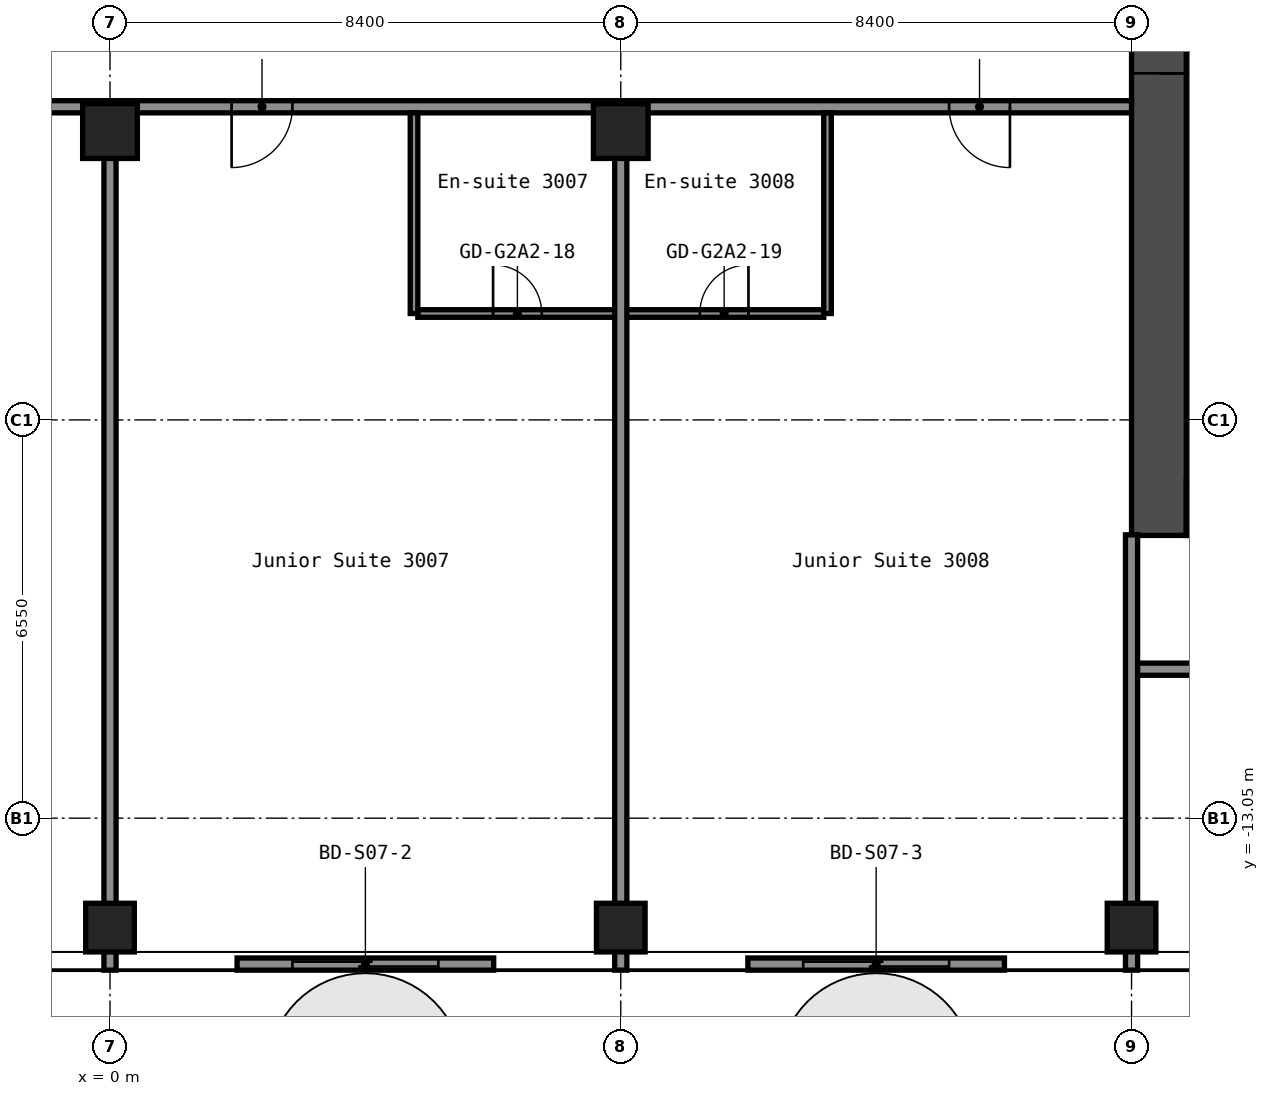
"""IFC4 building model, lengths in metres.
Left out: names, types, materials, properties, quantities, classifications, styles, units other than length and angle.
Written with IfcOpenShell. Run it as: python <this file> out.ifc"""

import sys

from ifc_helpers import new_model, si_unit, direction, frame, frame_2d, origin, origin_2d, place, context, subcontext, project, spatial, rectangle, hollow_rectangle, extrude, element, fill, save


model = new_model("IFC4")
c1 = context("Model", 3, precision=1e-05, world=origin(), true_north=direction((0.0, 1.0)))
c2 = subcontext(c1, "Body", "Model", "MODEL_VIEW")
j1 = project(units=[si_unit("LENGTHUNIT", "METRE"), si_unit("PLANEANGLEUNIT", "RADIAN")], contexts=[c1])
p1 = place(None, origin())
s1 = spatial("IfcSite", under=j1, at=p1, CompositionType="ELEMENT")
p2 = place(p1, origin())
s2 = spatial("IfcBuilding", under=s1, at=p2, CompositionType="ELEMENT")
p3 = place(p2, frame((0.0, 0.0, 107.4)))
s3 = spatial("IfcBuildingStorey", under=s2, at=p3, CompositionType="ELEMENT", Elevation=107.4)
p4 = place(p3, frame((0.0, -14.85, 0.0), z_axis=(0.0, 0.0, 1.0), x_axis=(1.0, 0.0, 0.0)))
e1 = element("IfcColumn", 1, at=p4, inside=s3, PredefinedType="COLUMN", context=c2, shape_type="SweptSolid", body=[
    extrude(hollow_rectangle(XDim=0.8, YDim=0.8, WallThickness=0.032, at=origin_2d()), origin(), (0.0, 0.0, 1.0), 2.8),
])
p5 = place(p3, frame((0.0, -1.75, 0.0), z_axis=(0.0, 0.0, 1.0), x_axis=(1.0, 0.0, 0.0)))
e2 = element("IfcColumn", 2, at=p5, inside=s3, PredefinedType="COLUMN", context=c2, shape_type="SweptSolid", body=[
    extrude(hollow_rectangle(XDim=0.9, YDim=0.9, WallThickness=0.036, at=origin_2d()), origin(), (0.0, 0.0, 1.0), 2.8),
])
p6 = place(p3, frame((8.4, -14.85, 0.0), z_axis=(0.0, 0.0, 1.0), x_axis=(1.0, 0.0, 0.0)))
e3 = element("IfcColumn", 3, at=p6, inside=s3, PredefinedType="COLUMN", context=c2, shape_type="SweptSolid", body=[
    extrude(hollow_rectangle(XDim=0.8, YDim=0.8, WallThickness=0.032, at=origin_2d()), origin(), (0.0, 0.0, 1.0), 2.8),
])
p7 = place(p3, frame((8.4, -1.75, 0.0), z_axis=(0.0, 0.0, 1.0), x_axis=(1.0, 0.0, 0.0)))
e4 = element("IfcColumn", 4, at=p7, inside=s3, PredefinedType="COLUMN", context=c2, shape_type="SweptSolid", body=[
    extrude(hollow_rectangle(XDim=0.9, YDim=0.9, WallThickness=0.036, at=origin_2d()), origin(), (0.0, 0.0, 1.0), 2.8),
])
p8 = place(p3, frame((16.8, -14.85, 0.0), z_axis=(0.0, 0.0, 1.0), x_axis=(1.0, 0.0, 0.0)))
e5 = element("IfcColumn", 5, at=p8, inside=s3, PredefinedType="COLUMN", context=c2, shape_type="SweptSolid", body=[
    extrude(hollow_rectangle(XDim=0.8, YDim=0.8, WallThickness=0.032, at=origin_2d()), origin(), (0.0, 0.0, 1.0), 2.8),
])
p9 = place(p3, frame((17.25, -8.4, 0.0), z_axis=(0.0, 0.0, 1.0), x_axis=(0.0, 1.0, 0.0)))
e6 = element("IfcWall", 6, at=p9, inside=s3, PredefinedType="SHEAR", context=c2, shape_type="SweptSolid", body=[
    extrude(rectangle(XDim=16.8, YDim=0.9, at=frame_2d((8.4, 0.0))), origin(), (0.0, 0.0, 1.0), 2.8),
])
p10 = place(p9, frame((7.6, 0.0, 0.0)))
e7 = element("IfcOpeningElement", 7, at=p10, cuts=e6, PredefinedType="OPENING", context=c2, shape_type="SweptSolid", body=[
    extrude(rectangle(XDim=1.2, YDim=2.1, at=frame_2d((0.6, 1.05))), frame((0.0, 0.46, 0.0), z_axis=(0.0, -1.0, 0.0), x_axis=(1.0, 0.0, 0.0)), (0.0, 0.0, 1.0), 0.92),
])
p11 = place(p3, frame((17.7, -7.95, 0.0), z_axis=(0.0, 0.0, 1.0), x_axis=(1.0, 0.0, 0.0)))
e8 = element("IfcWall", 8, at=p11, inside=s3, PredefinedType="SHEAR", context=c2, shape_type="SweptSolid", body=[
    extrude(rectangle(XDim=15.0, YDim=0.9, at=frame_2d((7.5, 0.0))), origin(), (0.0, 0.0, 1.0), 2.8),
])
p12 = place(p11, frame((2.55, 0.0, 0.0)))
e9 = element("IfcOpeningElement", 9, at=p12, cuts=e8, PredefinedType="OPENING", context=c2, shape_type="SweptSolid", body=[
    extrude(rectangle(XDim=1.0, YDim=2.1, at=frame_2d((0.5, 1.05))), frame((0.0, 0.46, 0.0), z_axis=(0.0, -1.0, 0.0), x_axis=(1.0, 0.0, 0.0)), (0.0, 0.0, 1.0), 0.92),
])
p13 = place(p3, frame((16.8, -10.6, 0.0), z_axis=(0.0, 0.0, 1.0), x_axis=(1.0, 0.0, 0.0)))
e10 = element("IfcWall", 10, at=p13, inside=s3, PredefinedType="PARTITIONING", context=c2, shape_type="SweptSolid", body=[
    extrude(rectangle(XDim=29.7, YDim=0.2, at=frame_2d((14.85, 0.0))), origin(), (0.0, 0.0, 1.0), 2.8),
])
p14 = place(p13, frame((3.7, 0.0, 0.0)))
e11 = element("IfcOpeningElement", 11, at=p14, cuts=e10, PredefinedType="OPENING", context=c2, shape_type="SweptSolid", body=[
    extrude(rectangle(XDim=1.0, YDim=2.1, at=frame_2d((0.5, 1.05))), frame((0.0, 0.11, 0.0), z_axis=(0.0, -1.0, 0.0), x_axis=(1.0, 0.0, 0.0)), (0.0, 0.0, 1.0), 0.22),
])
p15 = place(p13, frame((9.545, 0.0, 0.0)))
e12 = element("IfcOpeningElement", 12, at=p15, cuts=e10, PredefinedType="OPENING", context=c2, shape_type="SweptSolid", body=[
    extrude(rectangle(XDim=0.9, YDim=2.1, at=frame_2d((0.45, 1.05))), frame((0.0, 0.11, 0.0), z_axis=(0.0, -1.0, 0.0), x_axis=(1.0, 0.0, 0.0)), (0.0, 0.0, 1.0), 0.22),
])
p16 = place(p13, frame((13.745, 0.0, 0.0)))
e13 = element("IfcOpeningElement", 13, at=p16, cuts=e10, PredefinedType="OPENING", context=c2, shape_type="SweptSolid", body=[
    extrude(rectangle(XDim=0.9, YDim=2.1, at=frame_2d((0.45, 1.05))), frame((0.0, 0.11, 0.0), z_axis=(0.0, -1.0, 0.0), x_axis=(1.0, 0.0, 0.0)), (0.0, 0.0, 1.0), 0.22),
])
p17 = place(p13, frame((18.62, 0.0, 0.0)))
e14 = element("IfcOpeningElement", 14, at=p17, cuts=e10, PredefinedType="OPENING", context=c2, shape_type="SweptSolid", body=[
    extrude(rectangle(XDim=0.9, YDim=2.1, at=frame_2d((0.45, 1.05))), frame((0.0, 0.11, 0.0), z_axis=(0.0, -1.0, 0.0), x_axis=(1.0, 0.0, 0.0)), (0.0, 0.0, 1.0), 0.22),
])
p18 = place(p13, frame((22.82, 0.0, 0.0)))
e15 = element("IfcOpeningElement", 15, at=p18, cuts=e10, PredefinedType="OPENING", context=c2, shape_type="SweptSolid", body=[
    extrude(rectangle(XDim=0.9, YDim=2.1, at=frame_2d((0.45, 1.05))), frame((0.0, 0.11, 0.0), z_axis=(0.0, -1.0, 0.0), x_axis=(1.0, 0.0, 0.0)), (0.0, 0.0, 1.0), 0.22),
])
p19 = place(p13, frame((26.85, 0.0, 0.0)))
e16 = element("IfcOpeningElement", 16, at=p19, cuts=e10, PredefinedType="OPENING", context=c2, shape_type="SweptSolid", body=[
    extrude(rectangle(XDim=0.9, YDim=2.1, at=frame_2d((0.45, 1.05))), frame((0.0, 0.11, 0.0), z_axis=(0.0, -1.0, 0.0), x_axis=(1.0, 0.0, 0.0)), (0.0, 0.0, 1.0), 0.22),
])
p20 = place(p3, frame((5.062, -4.75, 0.0), z_axis=(0.0, 0.0, 1.0), x_axis=(1.0, 0.0, 0.0)))
e17 = element("IfcWall", 17, at=p20, inside=s3, PredefinedType="PARTITIONING", context=c2, shape_type="SweptSolid", body=[
    extrude(rectangle(XDim=6.675, YDim=0.125, at=frame_2d((3.337, 0.0))), origin(), (0.0, 0.0, 1.0), 2.8),
])
p21 = place(p20, frame((1.238, 0.0, 0.0)))
e18 = element("IfcOpeningElement", 18, at=p21, cuts=e17, PredefinedType="OPENING", context=c2, shape_type="SweptSolid", body=[
    extrude(rectangle(XDim=0.8, YDim=2.1, at=frame_2d((0.4, 1.05))), frame((0.0, 0.073, 0.0), z_axis=(0.0, -1.0, 0.0), x_axis=(1.0, 0.0, 0.0)), (0.0, 0.0, 1.0), 0.145),
])
p22 = place(p20, frame((4.637, 0.0, 0.0)))
e19 = element("IfcOpeningElement", 19, at=p22, cuts=e17, PredefinedType="OPENING", context=c2, shape_type="SweptSolid", body=[
    extrude(rectangle(XDim=0.8, YDim=2.1, at=frame_2d((0.4, 1.05))), frame((0.0, 0.073, 0.0), z_axis=(0.0, -1.0, 0.0), x_axis=(1.0, 0.0, 0.0)), (0.0, 0.0, 1.0), 0.145),
])
p23 = place(p3, frame((-16.8, -1.35, 0.0), z_axis=(0.0, 0.0, 1.0), x_axis=(1.0, 0.0, 0.0)))
e20 = element("IfcWall", 20, at=p23, inside=s3, PredefinedType="PARTITIONING", context=c2, shape_type="SweptSolid", body=[
    extrude(rectangle(XDim=33.6, YDim=0.2, at=frame_2d((16.8, 0.0))), origin(), (0.0, 0.0, 1.0), 2.8),
])
p24 = place(p23, frame((5.4, 0.0, 0.0)))
e21 = element("IfcOpeningElement", 21, at=p24, cuts=e20, PredefinedType="OPENING", context=c2, shape_type="SweptSolid", body=[
    extrude(rectangle(XDim=1.0, YDim=2.1, at=frame_2d((0.5, 1.05))), frame((0.0, 0.11, 0.0), z_axis=(0.0, -1.0, 0.0), x_axis=(1.0, 0.0, 0.0)), (0.0, 0.0, 1.0), 0.22),
])
p25 = place(p23, frame((9.46, 0.0, 0.0)))
e22 = element("IfcOpeningElement", 22, at=p25, cuts=e20, PredefinedType="OPENING", context=c2, shape_type="SweptSolid", body=[
    extrude(rectangle(XDim=0.9, YDim=2.1, at=frame_2d((0.45, 1.05))), frame((0.0, 0.11, 0.0), z_axis=(0.0, -1.0, 0.0), x_axis=(1.0, 0.0, 0.0)), (0.0, 0.0, 1.0), 0.22),
])
p26 = place(p23, frame((13.66, 0.0, 0.0)))
e23 = element("IfcOpeningElement", 23, at=p26, cuts=e20, PredefinedType="OPENING", context=c2, shape_type="SweptSolid", body=[
    extrude(rectangle(XDim=0.9, YDim=2.1, at=frame_2d((0.45, 1.05))), frame((0.0, 0.11, 0.0), z_axis=(0.0, -1.0, 0.0), x_axis=(1.0, 0.0, 0.0)), (0.0, 0.0, 1.0), 0.22),
])
p27 = place(p23, frame((18.8, 0.0, 0.0)))
e24 = element("IfcOpeningElement", 24, at=p27, cuts=e20, PredefinedType="OPENING", context=c2, shape_type="SweptSolid", body=[
    extrude(rectangle(XDim=1.0, YDim=2.1, at=frame_2d((0.5, 1.05))), frame((0.0, 0.11, 0.0), z_axis=(0.0, -1.0, 0.0), x_axis=(1.0, 0.0, 0.0)), (0.0, 0.0, 1.0), 0.22),
])
p28 = place(p23, frame((30.6, 0.0, 0.0)))
e25 = element("IfcOpeningElement", 25, at=p28, cuts=e20, PredefinedType="OPENING", context=c2, shape_type="SweptSolid", body=[
    extrude(rectangle(XDim=1.0, YDim=2.1, at=frame_2d((0.5, 1.05))), frame((0.0, 0.11, 0.0), z_axis=(0.0, -1.0, 0.0), x_axis=(1.0, 0.0, 0.0)), (0.0, 0.0, 1.0), 0.22),
])
p29 = place(p3, frame((0.0, -15.55, 0.0), z_axis=(0.0, 0.0, 1.0), x_axis=(0.0, 1.0, 0.0)))
e26 = element("IfcWall", 26, at=p29, inside=s3, PredefinedType="PARTITIONING", context=c2, shape_type="SweptSolid", body=[
    extrude(rectangle(XDim=13.36, YDim=0.2, at=frame_2d((6.68, 0.0))), origin(), (0.0, 0.0, 1.0), 2.8),
])
p30 = place(p3, frame((5.0, -4.75, 0.0), z_axis=(0.0, 0.0, 1.0), x_axis=(0.0, 1.0, 0.0)))
e27 = element("IfcWall", 27, at=p30, inside=s3, PredefinedType="PARTITIONING", context=c2, shape_type="SweptSolid", body=[
    extrude(rectangle(XDim=3.3, YDim=0.125, at=frame_2d((1.65, 0.0))), origin(), (0.0, 0.0, 1.0), 2.8),
])
p31 = place(p3, frame((8.4, -15.55, 0.0), z_axis=(0.0, 0.0, 1.0), x_axis=(0.0, 1.0, 0.0)))
e28 = element("IfcWall", 28, at=p31, inside=s3, PredefinedType="PARTITIONING", context=c2, shape_type="SweptSolid", body=[
    extrude(rectangle(XDim=13.36, YDim=0.2, at=frame_2d((6.68, 0.0))), origin(), (0.0, 0.0, 1.0), 2.8),
])
p32 = place(p3, frame((11.8, -4.75, 0.0), z_axis=(0.0, 0.0, 1.0), x_axis=(0.0, 1.0, 0.0)))
e29 = element("IfcWall", 29, at=p32, inside=s3, PredefinedType="PARTITIONING", context=c2, shape_type="SweptSolid", body=[
    extrude(rectangle(XDim=3.3, YDim=0.125, at=frame_2d((1.65, 0.0))), origin(), (0.0, 0.0, 1.0), 2.8),
])
p33 = place(p3, frame((16.8, -15.55, 0.0), z_axis=(0.0, 0.0, 1.0), x_axis=(0.0, 1.0, 0.0)))
e30 = element("IfcWall", 30, at=p33, inside=s3, PredefinedType="PARTITIONING", context=c2, shape_type="SweptSolid", body=[
    extrude(rectangle(XDim=7.16, YDim=0.2, at=frame_2d((3.58, 0.0))), origin(), (0.0, 0.0, 1.0), 2.8),
])
p34 = place(p3, frame((2.09, -15.45, 0.0), z_axis=(0.0, 0.0, 1.0), x_axis=(1.0, 0.0, 0.0)))
p35 = place(p34, frame((0.91, 0.0, 0.0)))
p36 = place(p35, frame((2.4, 0.0, 0.0), z_axis=(0.0, 0.0, 1.0), x_axis=(-1.0, 0.0, 0.0)))
e31 = element("IfcDoor", 31, at=p36, inside=s3, OperationType="SLIDING_TO_LEFT", PredefinedType="DOOR", context=c2, shape_type="SweptSolid", body=[
    extrude(rectangle(XDim=2.4, YDim=2.2, at=frame_2d((1.2, 1.1))), frame((0.0, 0.025, 0.0), z_axis=(0.0, -1.0, 0.0), x_axis=(1.0, 0.0, 0.0)), (0.0, 0.0, 1.0), 0.05),
])
p37 = place(p3, frame((10.49, -15.45, 0.0), z_axis=(0.0, 0.0, 1.0), x_axis=(1.0, 0.0, 0.0)))
p38 = place(p37, frame((0.91, 0.0, 0.0)))
p39 = place(p38, frame((2.4, 0.0, 0.0), z_axis=(0.0, 0.0, 1.0), x_axis=(-1.0, 0.0, 0.0)))
e32 = element("IfcDoor", 32, at=p39, inside=s3, OperationType="SLIDING_TO_LEFT", PredefinedType="DOOR", context=c2, shape_type="SweptSolid", body=[
    extrude(rectangle(XDim=2.4, YDim=2.2, at=frame_2d((1.2, 1.1))), frame((0.0, 0.025, 0.0), z_axis=(0.0, -1.0, 0.0), x_axis=(1.0, 0.0, 0.0)), (0.0, 0.0, 1.0), 0.05),
])
p40 = place(p10, origin())
e33 = element("IfcDoor", 33, at=p40, inside=s3, OperationType="DOUBLE_DOOR_SINGLE_SWING", PredefinedType="DOOR", context=c2, shape_type="SweptSolid", body=[
    extrude(rectangle(XDim=1.2, YDim=2.1, at=frame_2d((0.6, 1.05))), frame((0.0, 0.025, 0.0), z_axis=(0.0, -1.0, 0.0), x_axis=(1.0, 0.0, 0.0)), (0.0, 0.0, 1.0), 0.05),
])
fill(e7, e33)
p41 = place(p21, origin())
e34 = element("IfcDoor", 34, at=p41, inside=s3, OperationType="SINGLE_SWING_RIGHT", PredefinedType="DOOR", context=c2, shape_type="SweptSolid", body=[
    extrude(rectangle(XDim=0.8, YDim=2.1, at=frame_2d((0.4, 1.05))), frame((0.0, 0.025, 0.0), z_axis=(0.0, -1.0, 0.0), x_axis=(1.0, 0.0, 0.0)), (0.0, 0.0, 1.0), 0.05),
])
fill(e18, e34)
p42 = place(p22, origin())
e35 = element("IfcDoor", 35, at=p42, inside=s3, OperationType="SINGLE_SWING_LEFT", PredefinedType="DOOR", context=c2, shape_type="SweptSolid", body=[
    extrude(rectangle(XDim=0.8, YDim=2.1, at=frame_2d((0.4, 1.05))), frame((0.0, 0.025, 0.0), z_axis=(0.0, -1.0, 0.0), x_axis=(1.0, 0.0, 0.0)), (0.0, 0.0, 1.0), 0.05),
])
fill(e19, e35)
p43 = place(p27, origin())
e36 = element("IfcDoor", 36, at=p43, inside=s3, OperationType="SINGLE_SWING_LEFT", PredefinedType="DOOR", context=c2, shape_type="SweptSolid", body=[
    extrude(rectangle(XDim=1.0, YDim=2.1, at=frame_2d((0.5, 1.05))), frame((0.0, 0.025, 0.0), z_axis=(0.0, -1.0, 0.0), x_axis=(1.0, 0.0, 0.0)), (0.0, 0.0, 1.0), 0.05),
])
fill(e24, e36)
p44 = place(p28, origin())
e37 = element("IfcDoor", 37, at=p44, inside=s3, OperationType="SINGLE_SWING_RIGHT", PredefinedType="DOOR", context=c2, shape_type="SweptSolid", body=[
    extrude(rectangle(XDim=1.0, YDim=2.1, at=frame_2d((0.5, 1.05))), frame((0.0, 0.025, 0.0), z_axis=(0.0, -1.0, 0.0), x_axis=(1.0, 0.0, 0.0)), (0.0, 0.0, 1.0), 0.05),
])
fill(e25, e37)
save(model, sys.argv[1])
